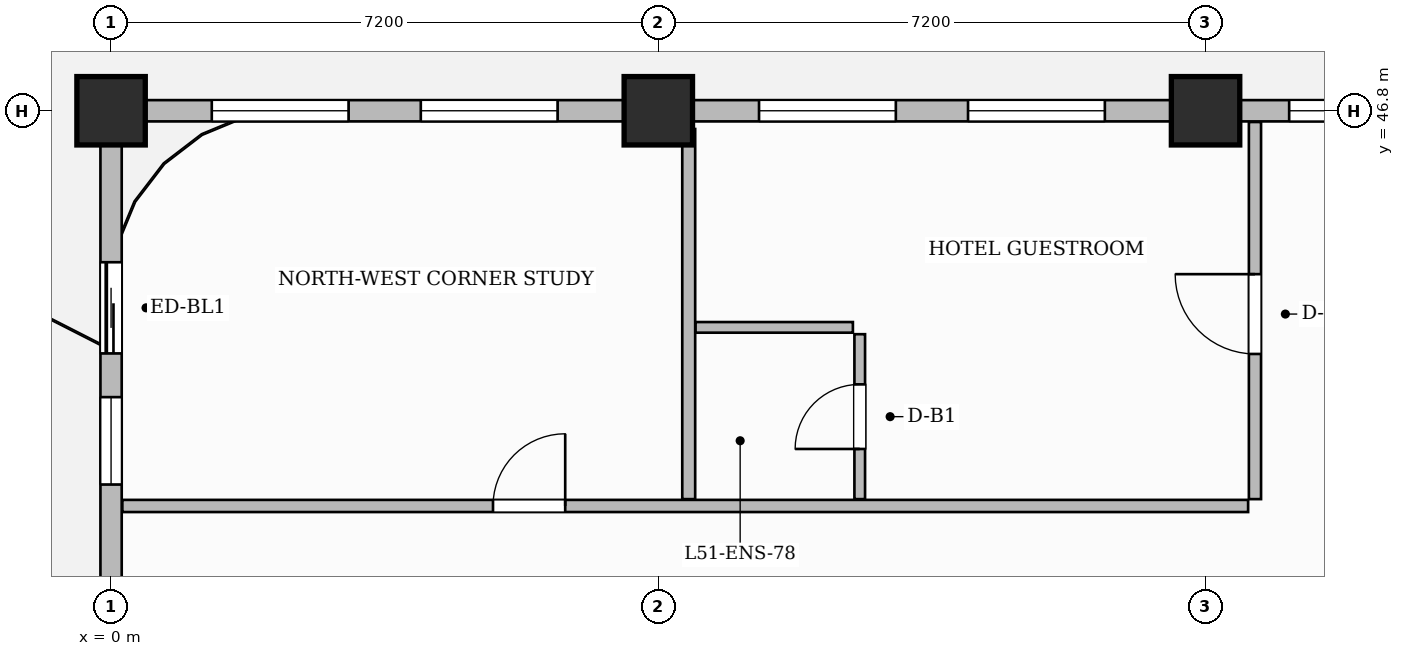
"""IFC4 building model, lengths in metres.
Left out: names, types, materials, properties, quantities, classifications, styles, units other than length and angle.
Written with IfcOpenShell. Run it as: python <this file> out.ifc"""

import sys

from ifc_helpers import new_model, si_unit, direction, frame, frame_2d, origin, origin_2d, place, context, subcontext, project, spatial, rectangle, extrude, source, transform, mapped, element, fill, save


model = new_model("IFC4")
c1 = context("Model", 3, precision=1e-05, world=origin(), true_north=direction((0.0, 1.0)))
c2 = subcontext(c1, "Body", "Model", "MODEL_VIEW")
j1 = project(units=[si_unit("LENGTHUNIT", "METRE"), si_unit("PLANEANGLEUNIT", "RADIAN")], contexts=[c1])
p1 = place(None, origin())
s1 = spatial("IfcSite", under=j1, at=p1, CompositionType="ELEMENT")
p2 = place(p1, origin())
s2 = spatial("IfcBuilding", under=s1, at=p2, CompositionType="ELEMENT")
p3 = place(p2, frame((0.0, 0.0, 205.75)))
s3 = spatial("IfcBuildingStorey", under=s2, at=p3, CompositionType="ELEMENT", Elevation=205.75)
m1 = source(origin(), c2, "Body", "SweptSolid", [
    extrude(rectangle(XDim=0.9, YDim=0.9, at=origin_2d()), origin(), (0.0, 0.0, 1.0), 3.85),
])
for number, where, z_axis, x_axis in (
    (1, (0.0, 46.8, 0.0), (0.0, 0.0, 1.0), (1.0, 0.0, 0.0)),
    (2, (7.2, 46.8, 0.0), (0.0, 0.0, 1.0), (1.0, 0.0, 0.0)),
    (3, (14.4, 46.8, 0.0), (0.0, 0.0, 1.0), (1.0, 0.0, 0.0)),
):
    element("IfcColumn", number, at=place(p3, frame(where, z_axis=z_axis, x_axis=x_axis)), inside=s3, PredefinedType="COLUMN", context=c2, shape_type="MappedRepresentation", body=[
        mapped(m1, transform((0.0, 0.0, 0.0), scale=1.0)),
    ])
p4 = place(p3, frame((15.05, 41.69, 0.0), z_axis=(0.0, 0.0, 1.0), x_axis=(0.0, 1.0, 0.0)))
e4 = element("IfcWall", 4, at=p4, inside=s3, PredefinedType="PARTITIONING", context=c2, shape_type="SweptSolid", body=[
    extrude(rectangle(XDim=4.962, YDim=0.16, at=frame_2d((2.481, 0.0))), origin(), (0.0, 0.0, 1.0), 3.6),
])
p5 = place(p4, frame((1.91, 0.0, 0.0)))
e5 = element("IfcOpeningElement", 5, at=p5, cuts=e4, PredefinedType="OPENING", context=c2, shape_type="SweptSolid", body=[
    extrude(rectangle(XDim=1.05, YDim=2.25, at=frame_2d((0.525, 1.125))), frame((0.0, 0.09, 0.0), z_axis=(0.0, -1.0, 0.0), x_axis=(1.0, 0.0, 0.0)), (0.0, 0.0, 1.0), 0.18),
])
p6 = place(p3, frame((7.6, 41.69, 0.0), z_axis=(0.0, 0.0, 1.0), x_axis=(0.0, 1.0, 0.0)))
e6 = element("IfcWall", 6, at=p6, inside=s3, PredefinedType="PARTITIONING", context=c2, shape_type="SweptSolid", body=[
    extrude(rectangle(XDim=4.87, YDim=0.17, at=frame_2d((2.435, 0.0))), origin(), (0.0, 0.0, 1.0), 3.6),
])
p7 = place(p3, frame((0.148, 41.6, 0.0), z_axis=(0.0, 0.0, 1.0), x_axis=(1.0, 0.0, 0.0)))
e7 = element("IfcWall", 7, at=p7, inside=s3, PredefinedType="PARTITIONING", context=c2, shape_type="SweptSolid", body=[
    extrude(rectangle(XDim=14.812, YDim=0.16, at=frame_2d((7.406, 0.0))), origin(), (0.0, 0.0, 1.0), 3.085),
])
p8 = place(p7, frame((4.877, 0.0, 0.0)))
e8 = element("IfcOpeningElement", 8, at=p8, cuts=e7, PredefinedType="OPENING", context=c2, shape_type="SweptSolid", body=[
    extrude(rectangle(XDim=0.95, YDim=2.15, at=frame_2d((0.475, 1.075))), frame((0.0, 0.09, 0.0), z_axis=(0.0, -1.0, 0.0), x_axis=(1.0, 0.0, 0.0)), (0.0, 0.0, 1.0), 0.18),
])
p9 = place(p3, frame((7.69, 43.95, 0.0), z_axis=(0.0, 0.0, 1.0), x_axis=(1.0, 0.0, 0.0)))
e9 = element("IfcWall", 9, at=p9, inside=s3, PredefinedType="PARTITIONING", context=c2, shape_type="SweptSolid", body=[
    extrude(rectangle(XDim=2.07, YDim=0.14, at=frame_2d((1.035, 0.0))), origin(), (0.0, 0.0, 1.0), 3.085),
])
p10 = place(p3, frame((9.85, 41.69, 0.0), z_axis=(0.0, 0.0, 1.0), x_axis=(0.0, 1.0, 0.0)))
e10 = element("IfcWall", 10, at=p10, inside=s3, PredefinedType="PARTITIONING", context=c2, shape_type="SweptSolid", body=[
    extrude(rectangle(XDim=2.17, YDim=0.14, at=frame_2d((1.085, 0.0))), origin(), (0.0, 0.0, 1.0), 3.6),
])
p11 = place(p10, frame((0.66, 0.0, 0.0)))
e11 = element("IfcOpeningElement", 11, at=p11, cuts=e10, PredefinedType="OPENING", context=c2, shape_type="SweptSolid", body=[
    extrude(rectangle(XDim=0.85, YDim=2.1, at=frame_2d((0.425, 1.05))), frame((0.0, 0.08, 0.0), z_axis=(0.0, -1.0, 0.0), x_axis=(1.0, 0.0, 0.0)), (0.0, 0.0, 1.0), 0.16),
])
p12 = place(p3, frame((0.0, 25.25, 0.0), z_axis=(0.0, 0.0, 1.0), x_axis=(0.0, 1.0, 0.0)))
e12 = element("IfcWall", 12, at=p12, inside=s3, PredefinedType="SOLIDWALL", context=c2, shape_type="SweptSolid", body=[
    extrude(rectangle(XDim=21.5, YDim=0.28, at=frame_2d((10.75, 0.0))), origin(), (0.0, 0.0, 1.0), 3.085),
])
p13 = place(p12, frame((18.357, 0.0, 0.0)))
e13 = element("IfcOpeningElement", 13, at=p13, cuts=e12, PredefinedType="OPENING", context=c2, shape_type="SweptSolid", body=[
    extrude(rectangle(XDim=1.2, YDim=2.2, at=frame_2d((0.6, 1.1))), frame((0.0, 0.15, 0.0), z_axis=(0.0, -1.0, 0.0), x_axis=(1.0, 0.0, 0.0)), (0.0, 0.0, 1.0), 0.3),
])
p14 = place(p12, frame((0.8, 0.0, 0.0)))
e14 = element("IfcOpeningElement", 14, at=p14, cuts=e12, PredefinedType="OPENING", context=c2, shape_type="SweptSolid", body=[
    extrude(rectangle(XDim=1.2, YDim=2.2, at=frame_2d((0.6, 1.1))), frame((0.0, 0.15, 0.0), z_axis=(0.0, -1.0, 0.0), x_axis=(1.0, 0.0, 0.0)), (0.0, 0.0, 1.0), 0.3),
])
p15 = place(p12, frame((3.425, 0.0, 0.8)))
e15 = element("IfcOpeningElement", 15, at=p15, cuts=e12, PredefinedType="OPENING", context=c2, shape_type="SweptSolid", body=[
    extrude(rectangle(XDim=1.8, YDim=1.85, at=frame_2d((0.9, 0.925))), frame((0.0, 0.15, 0.0), z_axis=(0.0, -1.0, 0.0), x_axis=(1.0, 0.0, 0.0)), (0.0, 0.0, 1.0), 0.3),
])
p16 = place(p12, frame((8.475, 0.0, 0.8)))
e16 = element("IfcOpeningElement", 16, at=p16, cuts=e12, PredefinedType="OPENING", context=c2, shape_type="SweptSolid", body=[
    extrude(rectangle(XDim=1.8, YDim=1.85, at=frame_2d((0.9, 0.925))), frame((0.0, 0.15, 0.0), z_axis=(0.0, -1.0, 0.0), x_axis=(1.0, 0.0, 0.0)), (0.0, 0.0, 1.0), 0.3),
])
p17 = place(p12, frame((11.225, 0.0, 0.8)))
e17 = element("IfcOpeningElement", 17, at=p17, cuts=e12, PredefinedType="OPENING", context=c2, shape_type="SweptSolid", body=[
    extrude(rectangle(XDim=1.8, YDim=1.85, at=frame_2d((0.9, 0.925))), frame((0.0, 0.15, 0.0), z_axis=(0.0, -1.0, 0.0), x_axis=(1.0, 0.0, 0.0)), (0.0, 0.0, 1.0), 0.3),
])
p18 = place(p12, frame((16.632, 0.0, 0.8)))
e18 = element("IfcOpeningElement", 18, at=p18, cuts=e12, PredefinedType="OPENING", context=c2, shape_type="SweptSolid", body=[
    extrude(rectangle(XDim=1.15, YDim=1.8, at=frame_2d((0.575, 0.9))), frame((0.0, 0.15, 0.0), z_axis=(0.0, -1.0, 0.0), x_axis=(1.0, 0.0, 0.0)), (0.0, 0.0, 1.0), 0.3),
])
p19 = place(p3, frame((0.0, 46.8, 0.0), z_axis=(0.0, 0.0, 1.0), x_axis=(1.0, 0.0, 0.0)))
e19 = element("IfcWall", 19, at=p19, inside=s3, PredefinedType="SOLIDWALL", context=c2, shape_type="SweptSolid", body=[
    extrude(rectangle(XDim=18.0, YDim=0.28, at=frame_2d((9.0, 0.0))), origin(), (0.0, 0.0, 1.0), 3.085),
])
p20 = place(p19, frame((1.325, 0.0, 0.8)))
e20 = element("IfcOpeningElement", 20, at=p20, cuts=e19, PredefinedType="OPENING", context=c2, shape_type="SweptSolid", body=[
    extrude(rectangle(XDim=1.8, YDim=1.85, at=frame_2d((0.9, 0.925))), frame((0.0, 0.15, 0.0), z_axis=(0.0, -1.0, 0.0), x_axis=(1.0, 0.0, 0.0)), (0.0, 0.0, 1.0), 0.3),
])
p21 = place(p19, frame((4.075, 0.0, 0.8)))
e21 = element("IfcOpeningElement", 21, at=p21, cuts=e19, PredefinedType="OPENING", context=c2, shape_type="SweptSolid", body=[
    extrude(rectangle(XDim=1.8, YDim=1.85, at=frame_2d((0.9, 0.925))), frame((0.0, 0.15, 0.0), z_axis=(0.0, -1.0, 0.0), x_axis=(1.0, 0.0, 0.0)), (0.0, 0.0, 1.0), 0.3),
])
p22 = place(p19, frame((8.525, 0.0, 0.8)))
e22 = element("IfcOpeningElement", 22, at=p22, cuts=e19, PredefinedType="OPENING", context=c2, shape_type="SweptSolid", body=[
    extrude(rectangle(XDim=1.8, YDim=1.85, at=frame_2d((0.9, 0.925))), frame((0.0, 0.15, 0.0), z_axis=(0.0, -1.0, 0.0), x_axis=(1.0, 0.0, 0.0)), (0.0, 0.0, 1.0), 0.3),
])
p23 = place(p19, frame((11.275, 0.0, 0.8)))
e23 = element("IfcOpeningElement", 23, at=p23, cuts=e19, PredefinedType="OPENING", context=c2, shape_type="SweptSolid", body=[
    extrude(rectangle(XDim=1.8, YDim=1.85, at=frame_2d((0.9, 0.925))), frame((0.0, 0.15, 0.0), z_axis=(0.0, -1.0, 0.0), x_axis=(1.0, 0.0, 0.0)), (0.0, 0.0, 1.0), 0.3),
])
p24 = place(p19, frame((15.5, 0.0, 0.8)))
e24 = element("IfcOpeningElement", 24, at=p24, cuts=e19, PredefinedType="OPENING", context=c2, shape_type="SweptSolid", body=[
    extrude(rectangle(XDim=1.4, YDim=1.85, at=frame_2d((0.7, 0.925))), frame((0.0, 0.15, 0.0), z_axis=(0.0, -1.0, 0.0), x_axis=(1.0, 0.0, 0.0)), (0.0, 0.0, 1.0), 0.3),
])
m2 = source(origin(), c2, "Body", "SweptSolid", [
    extrude(rectangle(XDim=0.95, YDim=2.15, at=frame_2d((0.475, 1.075))), frame((0.0, 0.025, 0.0), z_axis=(0.0, -1.0, 0.0), x_axis=(1.0, 0.0, 0.0)), (0.0, 0.0, 1.0), 0.05),
])
p25 = place(p8, origin())
e25 = element("IfcDoor", 25, at=p25, inside=s3, OperationType="SINGLE_SWING_RIGHT", PredefinedType="DOOR", context=c2, shape_type="MappedRepresentation", body=[
    mapped(m2, transform((0.0, 0.0, 0.0), scale=1.0)),
])
fill(e8, e25)
m3 = source(origin(), c2, "Body", "SweptSolid", [
    extrude(rectangle(XDim=0.85, YDim=2.1, at=frame_2d((0.425, 1.05))), frame((0.0, 0.025, 0.0), z_axis=(0.0, -1.0, 0.0), x_axis=(1.0, 0.0, 0.0)), (0.0, 0.0, 1.0), 0.05),
])
p26 = place(p11, origin())
e26 = element("IfcDoor", 26, at=p26, inside=s3, OperationType="SINGLE_SWING_LEFT", PredefinedType="DOOR", context=c2, shape_type="MappedRepresentation", body=[
    mapped(m3, transform((0.0, 0.0, 0.0), scale=1.0)),
])
fill(e11, e26)
m4 = source(origin(), c2, "Body", "SweptSolid", [
    extrude(rectangle(XDim=1.05, YDim=2.25, at=frame_2d((0.525, 1.125))), frame((0.0, 0.025, 0.0), z_axis=(0.0, -1.0, 0.0), x_axis=(1.0, 0.0, 0.0)), (0.0, 0.0, 1.0), 0.05),
])
p27 = place(p5, origin())
e27 = element("IfcDoor", 27, at=p27, inside=s3, OperationType="SINGLE_SWING_RIGHT", PredefinedType="DOOR", context=c2, shape_type="MappedRepresentation", body=[
    mapped(m4, transform((0.0, 0.0, 0.0), scale=1.0)),
])
fill(e5, e27)
m5 = source(origin(), c2, "Body", "SweptSolid", [
    extrude(rectangle(XDim=1.2, YDim=2.2, at=frame_2d((0.6, 1.1))), frame((0.0, 0.025, 0.0), z_axis=(0.0, -1.0, 0.0), x_axis=(1.0, 0.0, 0.0)), (0.0, 0.0, 1.0), 0.05),
])
p28 = place(p13, origin())
e28 = element("IfcDoor", 28, at=p28, inside=s3, OperationType="SLIDING_TO_LEFT", PredefinedType="DOOR", context=c2, shape_type="MappedRepresentation", body=[
    mapped(m5, transform((0.0, 0.0, 0.0), scale=1.0)),
])
fill(e13, e28)
m6 = source(origin(), c2, "Body", "SweptSolid", [
    extrude(rectangle(XDim=1.15, YDim=1.8, at=frame_2d((0.575, 0.9))), frame((0.0, 0.03, 0.0), z_axis=(0.0, -1.0, 0.0), x_axis=(1.0, 0.0, 0.0)), (0.0, 0.0, 1.0), 0.06),
])
p29 = place(p18, origin())
e29 = element("IfcWindow", 29, at=p29, inside=s3, PartitioningType="SINGLE_PANEL", PredefinedType="WINDOW", context=c2, shape_type="MappedRepresentation", body=[
    mapped(m6, transform((0.0, 0.0, 0.0), scale=1.0)),
])
fill(e18, e29)
m7 = source(origin(), c2, "Body", "SweptSolid", [
    extrude(rectangle(XDim=1.8, YDim=1.85, at=frame_2d((0.9, 0.925))), frame((0.0, 0.03, 0.0), z_axis=(0.0, -1.0, 0.0), x_axis=(1.0, 0.0, 0.0)), (0.0, 0.0, 1.0), 0.06),
])
p30 = place(p20, origin())
e30 = element("IfcWindow", 30, at=p30, inside=s3, PartitioningType="DOUBLE_PANEL_VERTICAL", PredefinedType="WINDOW", context=c2, shape_type="MappedRepresentation", body=[
    mapped(m7, transform((0.0, 0.0, 0.0), scale=1.0)),
])
fill(e20, e30)
p31 = place(p21, origin())
e31 = element("IfcWindow", 31, at=p31, inside=s3, PartitioningType="DOUBLE_PANEL_VERTICAL", PredefinedType="WINDOW", context=c2, shape_type="MappedRepresentation", body=[
    mapped(m7, transform((0.0, 0.0, 0.0), scale=1.0)),
])
fill(e21, e31)
p32 = place(p22, origin())
e32 = element("IfcWindow", 32, at=p32, inside=s3, PartitioningType="DOUBLE_PANEL_VERTICAL", PredefinedType="WINDOW", context=c2, shape_type="MappedRepresentation", body=[
    mapped(m7, transform((0.0, 0.0, 0.0), scale=1.0)),
])
fill(e22, e32)
p33 = place(p23, origin())
e33 = element("IfcWindow", 33, at=p33, inside=s3, PartitioningType="DOUBLE_PANEL_VERTICAL", PredefinedType="WINDOW", context=c2, shape_type="MappedRepresentation", body=[
    mapped(m7, transform((0.0, 0.0, 0.0), scale=1.0)),
])
fill(e23, e33)
m8 = source(origin(), c2, "Body", "SweptSolid", [
    extrude(rectangle(XDim=1.4, YDim=1.85, at=frame_2d((0.7, 0.925))), frame((0.0, 0.03, 0.0), z_axis=(0.0, -1.0, 0.0), x_axis=(1.0, 0.0, 0.0)), (0.0, 0.0, 1.0), 0.06),
])
p34 = place(p24, origin())
e34 = element("IfcWindow", 34, at=p34, inside=s3, PartitioningType="SINGLE_PANEL", PredefinedType="WINDOW", context=c2, shape_type="MappedRepresentation", body=[
    mapped(m8, transform((0.0, 0.0, 0.0), scale=1.0)),
])
fill(e24, e34)
save(model, sys.argv[1])
